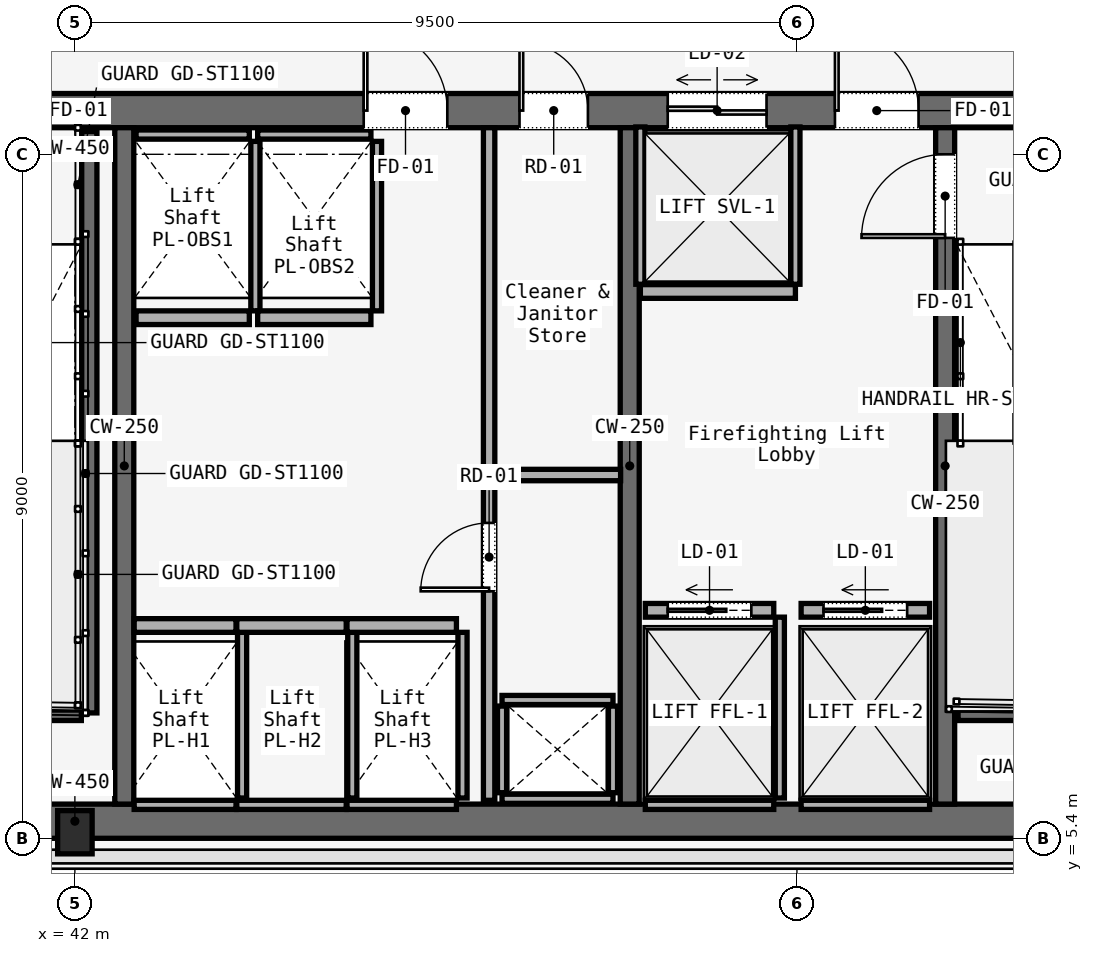
"""IFC4 building model, lengths in metres.
Left out: names, types, materials, properties, quantities, classifications, styles, units other than length and angle.
Written with IfcOpenShell. Run it as: python <this file> out.ifc"""

import sys

from ifc_helpers import new_model, si_unit, direction, frame, frame_2d, origin, origin_2d, place, context, subcontext, project, spatial, rectangle, i_section, extrude, element, fill, save


model = new_model("IFC4")
c1 = context("Model", 3, precision=1e-05, world=origin(), true_north=direction((0.0, 1.0)))
c2 = subcontext(c1, "Body", "Model", "MODEL_VIEW")
j1 = project(units=[si_unit("LENGTHUNIT", "METRE"), si_unit("PLANEANGLEUNIT", "RADIAN")], contexts=[c1])
p1 = place(None, origin())
s1 = spatial("IfcSite", under=j1, at=p1, CompositionType="ELEMENT")
p2 = place(p1, origin())
s2 = spatial("IfcBuilding", under=s1, at=p2, CompositionType="ELEMENT")
p3 = place(p2, frame((0.0, 0.0, 51.2)))
s3 = spatial("IfcBuildingStorey", under=s2, at=p3, CompositionType="ELEMENT", Elevation=51.2)
p4 = place(p3, frame((26.45, 14.975, 0.0), z_axis=(0.0, 0.0, 1.0), x_axis=(1.0, 0.0, 0.0)))
e1 = element("IfcWall", 1, at=p4, inside=s3, PredefinedType="SOLIDWALL", context=c2, shape_type="SweptSolid", body=[
    extrude(rectangle(XDim=31.1, YDim=0.45, at=frame_2d((15.55, 0.0))), origin(), (0.0, 0.0, 1.0), 3.58),
])
p5 = place(p4, frame((1.65, 0.0, 0.0)))
e2 = element("IfcOpeningElement", 2, at=p5, cuts=e1, PredefinedType="OPENING", context=c2, shape_type="SweptSolid", body=[
    extrude(rectangle(XDim=1.1, YDim=2.2, at=frame_2d((0.55, 1.1))), frame((0.0, 0.225, 0.0), z_axis=(0.0, -1.0, 0.0), x_axis=(1.0, 0.0, 0.0)), (0.0, 0.0, 1.0), 0.45),
])
p6 = place(p4, frame((13.65, 0.0, 0.0)))
e3 = element("IfcOpeningElement", 3, at=p6, cuts=e1, PredefinedType="OPENING", context=c2, shape_type="SweptSolid", body=[
    extrude(rectangle(XDim=1.1, YDim=2.2, at=frame_2d((0.55, 1.1))), frame((0.0, 0.225, 0.0), z_axis=(0.0, -1.0, 0.0), x_axis=(1.0, 0.0, 0.0)), (0.0, 0.0, 1.0), 0.45),
])
p7 = place(p4, frame((25.55, 0.0, 0.0)))
e4 = element("IfcOpeningElement", 4, at=p7, cuts=e1, PredefinedType="OPENING", context=c2, shape_type="SweptSolid", body=[
    extrude(rectangle(XDim=1.1, YDim=2.2, at=frame_2d((0.55, 1.1))), frame((0.0, 0.225, 0.0), z_axis=(0.0, -1.0, 0.0), x_axis=(1.0, 0.0, 0.0)), (0.0, 0.0, 1.0), 0.45),
])
p8 = place(p4, frame((10.7, 0.0, 0.0)))
e5 = element("IfcOpeningElement", 5, at=p8, cuts=e1, PredefinedType="OPENING", context=c2, shape_type="SweptSolid", body=[
    extrude(rectangle(XDim=1.4, YDim=2.2, at=frame_2d((0.7, 1.1))), frame((0.0, 0.225, 0.0), z_axis=(0.0, -1.0, 0.0), x_axis=(1.0, 0.0, 0.0)), (0.0, 0.0, 1.0), 0.45),
])
p9 = place(p4, frame((19.35, 0.0, 0.0)))
e6 = element("IfcOpeningElement", 6, at=p9, cuts=e1, PredefinedType="OPENING", context=c2, shape_type="SweptSolid", body=[
    extrude(rectangle(XDim=1.1, YDim=2.2, at=frame_2d((0.55, 1.1))), frame((0.0, 0.225, 0.0), z_axis=(0.0, -1.0, 0.0), x_axis=(1.0, 0.0, 0.0)), (0.0, 0.0, 1.0), 0.45),
])
p10 = place(p4, frame((21.4, 0.0, 0.0)))
e7 = element("IfcOpeningElement", 7, at=p10, cuts=e1, PredefinedType="OPENING", context=c2, shape_type="SweptSolid", body=[
    extrude(rectangle(XDim=0.9, YDim=2.1, at=frame_2d((0.45, 1.05))), frame((0.0, 0.225, 0.0), z_axis=(0.0, -1.0, 0.0), x_axis=(1.0, 0.0, 0.0)), (0.0, 0.0, 1.0), 0.45),
])
p11 = place(p4, frame((23.35, 0.0, 0.0)))
e8 = element("IfcOpeningElement", 8, at=p11, cuts=e1, PredefinedType="OPENING", context=c2, shape_type="SweptSolid", body=[
    extrude(rectangle(XDim=1.3, YDim=2.3, at=frame_2d((0.65, 1.15))), frame((0.0, 0.225, 0.0), z_axis=(0.0, -1.0, 0.0), x_axis=(1.0, 0.0, 0.0)), (0.0, 0.0, 1.0), 0.45),
])
p12 = place(p3, frame((26.45, 5.625, 0.0), z_axis=(0.0, 0.0, 1.0), x_axis=(1.0, 0.0, 0.0)))
e9 = element("IfcWall", 9, at=p12, inside=s3, PredefinedType="SOLIDWALL", context=c2, shape_type="SweptSolid", body=[
    extrude(rectangle(XDim=31.1, YDim=0.45, at=frame_2d((15.55, 0.0))), origin(), (0.0, 0.0, 1.0), 3.58),
])
for number, where, z_axis, x_axis in (
    (10, (42.65, 5.85, 0.0), (0.0, 0.0, 1.0), (0.0, 1.0, 0.0)),
    (11, (49.3, 5.85, 0.0), (0.0, 0.0, 1.0), (0.0, 1.0, 0.0)),
):
    element("IfcWall", number, at=place(p3, frame(where, z_axis=z_axis, x_axis=x_axis)), inside=s3, PredefinedType="SOLIDWALL", context=c2, shape_type="SweptSolid", body=[
        extrude(rectangle(XDim=8.9, YDim=0.25, at=frame_2d((4.45, 0.0))), origin(), (0.0, 0.0, 1.0), 3.58),
    ])
p13 = place(p3, frame((53.45, 5.85, 0.0), z_axis=(0.0, 0.0, 1.0), x_axis=(0.0, 1.0, 0.0)))
e12 = element("IfcWall", 12, at=p13, inside=s3, PredefinedType="SOLIDWALL", context=c2, shape_type="SweptSolid", body=[
    extrude(rectangle(XDim=8.9, YDim=0.25, at=frame_2d((4.45, 0.0))), origin(), (0.0, 0.0, 1.0), 3.58),
])
p14 = place(p13, frame((7.45, 0.0, 0.0)))
e13 = element("IfcOpeningElement", 13, at=p14, cuts=e12, PredefinedType="OPENING", context=c2, shape_type="SweptSolid", body=[
    extrude(rectangle(XDim=1.1, YDim=2.2, at=frame_2d((0.55, 1.1))), frame((0.0, 0.125, 0.0), z_axis=(0.0, -1.0, 0.0), x_axis=(1.0, 0.0, 0.0)), (0.0, 0.0, 1.0), 0.25),
])
p15 = place(p3, frame((42.0, 5.48, 0.0), z_axis=(0.0, 0.0, 1.0), x_axis=(1.0, 0.0, 0.0)))
e14 = element("IfcColumn", 14, at=p15, inside=s3, PredefinedType="COLUMN", context=c2, shape_type="SweptSolid", body=[
    extrude(i_section(OverallWidth=0.454, OverallDepth=0.569, WebThickness=0.078, FlangeThickness=0.08, FilletRadius=0.015, at=origin_2d()), origin(), (0.0, 0.0, 1.0), 3.58),
])
p16 = place(p3, frame((42.19, 14.7, 0.0), z_axis=(0.0, 0.0, 1.0), x_axis=(0.0, -1.0, 0.0)))
e15 = element("IfcWall", 15, at=p16, inside=s3, PredefinedType="SOLIDWALL", context=c2, shape_type="SweptSolid", body=[
    extrude(rectangle(XDim=7.65, YDim=0.2, at=frame_2d((3.825, 0.0))), origin(), (0.0, 0.0, 1.0), 3.8),
])
for number, where, z_axis, x_axis in (
    (16, (38.97, 7.05, 0.0), (0.0, 0.0, 1.0), (1.0, 0.0, 0.0)),
    (17, (53.62, 7.05, 0.0), (0.0, 0.0, 1.0), (1.0, 0.0, 0.0)),
):
    element("IfcWall", number, at=place(p3, frame(where, z_axis=z_axis, x_axis=x_axis)), inside=s3, PredefinedType="SOLIDWALL", context=c2, shape_type="SweptSolid", body=[
        extrude(rectangle(XDim=3.115, YDim=0.2, at=frame_2d((1.558, 0.0))), origin(), (0.0, 0.0, 1.0), 3.8),
    ])
for number, where, z_axis, x_axis in (
    (18, (47.62, 5.92, 0.0), (0.0, 0.0, 1.0), (1.0, 0.0, 0.0)),
    (19, (47.62, 7.22, 0.0), (0.0, 0.0, 1.0), (1.0, 0.0, 0.0)),
):
    element("IfcWall", number, at=place(p3, frame(where, z_axis=z_axis, x_axis=x_axis)), inside=s3, PredefinedType="SOLIDWALL", context=c2, shape_type="SweptSolid", body=[
        extrude(rectangle(XDim=1.46, YDim=0.12, at=frame_2d((0.73, 0.0))), origin(), (0.0, 0.0, 1.0), 2.933),
    ])
for number, where, z_axis, x_axis in (
    (20, (47.62, 6.0, 0.0), (0.0, 0.0, 1.0), (0.0, 1.0, 0.0)),
    (21, (49.08, 6.0, 0.0), (0.0, 0.0, 1.0), (0.0, 1.0, 0.0)),
):
    element("IfcWall", number, at=place(p3, frame(where, z_axis=z_axis, x_axis=x_axis)), inside=s3, PredefinedType="SOLIDWALL", context=c2, shape_type="SweptSolid", body=[
        extrude(rectangle(XDim=1.14, YDim=0.12, at=frame_2d((0.57, 0.0))), origin(), (0.0, 0.0, 1.0), 2.933),
    ])
p17 = place(p3, frame((47.45, 5.9, 0.0), z_axis=(0.0, 0.0, 1.0), x_axis=(0.0, 1.0, 0.0)))
e22 = element("IfcWall", 22, at=p17, inside=s3, PredefinedType="PARTITIONING", context=c2, shape_type="SweptSolid", body=[
    extrude(rectangle(XDim=8.85, YDim=0.15, at=frame_2d((4.425, 0.0))), origin(), (0.0, 0.0, 1.0), 2.933),
])
p18 = place(p17, frame((2.75, 0.0, 0.0)))
e23 = element("IfcOpeningElement", 23, at=p18, cuts=e22, PredefinedType="OPENING", context=c2, shape_type="SweptSolid", body=[
    extrude(rectangle(XDim=0.9, YDim=2.1, at=frame_2d((0.45, 1.05))), frame((0.0, 0.075, 0.0), z_axis=(0.0, -1.0, 0.0), x_axis=(1.0, 0.0, 0.0)), (0.0, 0.0, 1.0), 0.15),
])
p19 = place(p3, frame((47.45, 10.18, 0.0), z_axis=(0.0, 0.0, 1.0), x_axis=(1.0, 0.0, 0.0)))
e24 = element("IfcWall", 24, at=p19, inside=s3, PredefinedType="PARTITIONING", context=c2, shape_type="SweptSolid", body=[
    extrude(rectangle(XDim=1.73, YDim=0.15, at=frame_2d((0.865, 0.0))), origin(), (0.0, 0.0, 1.0), 2.933),
])
p20 = place(p3, frame((42.78, 8.2, 0.0), z_axis=(0.0, 0.0, 1.0), x_axis=(1.0, 0.0, 0.0)))
e25 = element("IfcWall", 25, at=p20, inside=s3, PredefinedType="SOLIDWALL", context=c2, shape_type="SweptSolid", body=[
    extrude(rectangle(XDim=1.34, YDim=0.18, at=frame_2d((0.67, 0.0))), origin(), (0.0, 0.0, 1.0), 2.933),
])
p21 = place(p3, frame((42.78, 5.84, 0.0), z_axis=(0.0, 0.0, 1.0), x_axis=(1.0, 0.0, 0.0)))
e26 = element("IfcWall", 26, at=p21, inside=s3, PredefinedType="SOLIDWALL", context=c2, shape_type="SweptSolid", body=[
    extrude(rectangle(XDim=1.34, YDim=0.12, at=frame_2d((0.67, 0.0))), origin(), (0.0, 0.0, 1.0), 2.933),
])
p22 = place(p3, frame((44.2, 5.93, 0.0), z_axis=(0.0, 0.0, 1.0), x_axis=(0.0, 1.0, 0.0)))
e27 = element("IfcWall", 27, at=p22, inside=s3, PredefinedType="SOLIDWALL", context=c2, shape_type="SweptSolid", body=[
    extrude(rectangle(XDim=2.18, YDim=0.12, at=frame_2d((1.09, 0.0))), origin(), (0.0, 0.0, 1.0), 2.933),
])
p23 = place(p3, frame((44.13, 8.2, 0.0), z_axis=(0.0, 0.0, 1.0), x_axis=(1.0, 0.0, 0.0)))
e28 = element("IfcWall", 28, at=p23, inside=s3, PredefinedType="SOLIDWALL", context=c2, shape_type="SweptSolid", body=[
    extrude(rectangle(XDim=1.44, YDim=0.18, at=frame_2d((0.72, 0.0))), origin(), (0.0, 0.0, 1.0), 2.933),
])
p24 = place(p3, frame((44.13, 5.84, 0.0), z_axis=(0.0, 0.0, 1.0), x_axis=(1.0, 0.0, 0.0)))
e29 = element("IfcWall", 29, at=p24, inside=s3, PredefinedType="SOLIDWALL", context=c2, shape_type="SweptSolid", body=[
    extrude(rectangle(XDim=1.44, YDim=0.12, at=frame_2d((0.72, 0.0))), origin(), (0.0, 0.0, 1.0), 2.933),
])
p25 = place(p3, frame((45.65, 5.93, 0.0), z_axis=(0.0, 0.0, 1.0), x_axis=(0.0, 1.0, 0.0)))
e30 = element("IfcWall", 30, at=p25, inside=s3, PredefinedType="SOLIDWALL", context=c2, shape_type="SweptSolid", body=[
    extrude(rectangle(XDim=2.18, YDim=0.12, at=frame_2d((1.09, 0.0))), origin(), (0.0, 0.0, 1.0), 2.933),
])
p26 = place(p3, frame((45.58, 8.2, 0.0), z_axis=(0.0, 0.0, 1.0), x_axis=(1.0, 0.0, 0.0)))
e31 = element("IfcWall", 31, at=p26, inside=s3, PredefinedType="SOLIDWALL", context=c2, shape_type="SweptSolid", body=[
    extrude(rectangle(XDim=1.44, YDim=0.18, at=frame_2d((0.72, 0.0))), origin(), (0.0, 0.0, 1.0), 2.933),
])
p27 = place(p3, frame((45.58, 5.84, 0.0), z_axis=(0.0, 0.0, 1.0), x_axis=(1.0, 0.0, 0.0)))
e32 = element("IfcWall", 32, at=p27, inside=s3, PredefinedType="SOLIDWALL", context=c2, shape_type="SweptSolid", body=[
    extrude(rectangle(XDim=1.44, YDim=0.12, at=frame_2d((0.72, 0.0))), origin(), (0.0, 0.0, 1.0), 2.933),
])
p28 = place(p3, frame((47.1, 5.93, 0.0), z_axis=(0.0, 0.0, 1.0), x_axis=(0.0, 1.0, 0.0)))
e33 = element("IfcWall", 33, at=p28, inside=s3, PredefinedType="SOLIDWALL", context=c2, shape_type="SweptSolid", body=[
    extrude(rectangle(XDim=2.18, YDim=0.12, at=frame_2d((1.09, 0.0))), origin(), (0.0, 0.0, 1.0), 2.933),
])
p29 = place(p3, frame((42.805, 12.25, 0.0), z_axis=(0.0, 0.0, 1.0), x_axis=(1.0, 0.0, 0.0)))
e34 = element("IfcWall", 34, at=p29, inside=s3, PredefinedType="SOLIDWALL", context=c2, shape_type="SweptSolid", body=[
    extrude(rectangle(XDim=1.49, YDim=0.18, at=frame_2d((0.745, 0.0))), origin(), (0.0, 0.0, 1.0), 2.933),
])
p30 = place(p3, frame((42.805, 14.66, 0.0), z_axis=(0.0, 0.0, 1.0), x_axis=(1.0, 0.0, 0.0)))
e35 = element("IfcWall", 35, at=p30, inside=s3, PredefinedType="SOLIDWALL", context=c2, shape_type="SweptSolid", body=[
    extrude(rectangle(XDim=1.49, YDim=0.12, at=frame_2d((0.745, 0.0))), origin(), (0.0, 0.0, 1.0), 2.933),
])
p31 = place(p3, frame((44.375, 12.34, 0.0), z_axis=(0.0, 0.0, 1.0), x_axis=(0.0, 1.0, 0.0)))
e36 = element("IfcWall", 36, at=p31, inside=s3, PredefinedType="SOLIDWALL", context=c2, shape_type="SweptSolid", body=[
    extrude(rectangle(XDim=2.23, YDim=0.12, at=frame_2d((1.115, 0.0))), origin(), (0.0, 0.0, 1.0), 2.933),
])
p32 = place(p3, frame((44.405, 12.25, 0.0), z_axis=(0.0, 0.0, 1.0), x_axis=(1.0, 0.0, 0.0)))
e37 = element("IfcWall", 37, at=p32, inside=s3, PredefinedType="SOLIDWALL", context=c2, shape_type="SweptSolid", body=[
    extrude(rectangle(XDim=1.49, YDim=0.18, at=frame_2d((0.745, 0.0))), origin(), (0.0, 0.0, 1.0), 2.933),
])
p33 = place(p3, frame((44.405, 14.66, 0.0), z_axis=(0.0, 0.0, 1.0), x_axis=(1.0, 0.0, 0.0)))
e38 = element("IfcWall", 38, at=p33, inside=s3, PredefinedType="SOLIDWALL", context=c2, shape_type="SweptSolid", body=[
    extrude(rectangle(XDim=1.49, YDim=0.12, at=frame_2d((0.745, 0.0))), origin(), (0.0, 0.0, 1.0), 2.933),
])
p34 = place(p3, frame((45.975, 12.34, 0.0), z_axis=(0.0, 0.0, 1.0), x_axis=(0.0, 1.0, 0.0)))
e39 = element("IfcWall", 39, at=p34, inside=s3, PredefinedType="SOLIDWALL", context=c2, shape_type="SweptSolid", body=[
    extrude(rectangle(XDim=2.23, YDim=0.12, at=frame_2d((1.115, 0.0))), origin(), (0.0, 0.0, 1.0), 2.933),
])
p35 = place(p3, frame((49.505, 8.4, 0.0), z_axis=(0.0, 0.0, 1.0), x_axis=(1.0, 0.0, 0.0)))
e40 = element("IfcWall", 40, at=p35, inside=s3, PredefinedType="SOLIDWALL", context=c2, shape_type="SweptSolid", body=[
    extrude(rectangle(XDim=1.69, YDim=0.18, at=frame_2d((0.845, 0.0))), origin(), (0.0, 0.0, 1.0), 2.933),
])
p36 = place(p35, frame((0.295, 0.0, 0.0)))
e41 = element("IfcOpeningElement", 41, at=p36, cuts=e40, PredefinedType="OPENING", context=c2, shape_type="SweptSolid", body=[
    extrude(rectangle(XDim=1.1, YDim=2.2, at=frame_2d((0.55, 1.1))), frame((0.0, 0.09, 0.0), z_axis=(0.0, -1.0, 0.0), x_axis=(1.0, 0.0, 0.0)), (0.0, 0.0, 1.0), 0.18),
])
p37 = place(p3, frame((49.505, 5.84, 0.0), z_axis=(0.0, 0.0, 1.0), x_axis=(1.0, 0.0, 0.0)))
e42 = element("IfcWall", 42, at=p37, inside=s3, PredefinedType="SOLIDWALL", context=c2, shape_type="SweptSolid", body=[
    extrude(rectangle(XDim=1.69, YDim=0.12, at=frame_2d((0.845, 0.0))), origin(), (0.0, 0.0, 1.0), 2.933),
])
p38 = place(p3, frame((51.275, 5.93, 0.0), z_axis=(0.0, 0.0, 1.0), x_axis=(0.0, 1.0, 0.0)))
e43 = element("IfcWall", 43, at=p38, inside=s3, PredefinedType="SOLIDWALL", context=c2, shape_type="SweptSolid", body=[
    extrude(rectangle(XDim=2.38, YDim=0.12, at=frame_2d((1.19, 0.0))), origin(), (0.0, 0.0, 1.0), 2.933),
])
p39 = place(p3, frame((51.555, 8.4, 0.0), z_axis=(0.0, 0.0, 1.0), x_axis=(1.0, 0.0, 0.0)))
e44 = element("IfcWall", 44, at=p39, inside=s3, PredefinedType="SOLIDWALL", context=c2, shape_type="SweptSolid", body=[
    extrude(rectangle(XDim=1.69, YDim=0.18, at=frame_2d((0.845, 0.0))), origin(), (0.0, 0.0, 1.0), 2.933),
])
p40 = place(p39, frame((0.295, 0.0, 0.0)))
e45 = element("IfcOpeningElement", 45, at=p40, cuts=e44, PredefinedType="OPENING", context=c2, shape_type="SweptSolid", body=[
    extrude(rectangle(XDim=1.1, YDim=2.2, at=frame_2d((0.55, 1.1))), frame((0.0, 0.09, 0.0), z_axis=(0.0, -1.0, 0.0), x_axis=(1.0, 0.0, 0.0)), (0.0, 0.0, 1.0), 0.18),
])
p41 = place(p3, frame((51.555, 5.84, 0.0), z_axis=(0.0, 0.0, 1.0), x_axis=(1.0, 0.0, 0.0)))
e46 = element("IfcWall", 46, at=p41, inside=s3, PredefinedType="SOLIDWALL", context=c2, shape_type="SweptSolid", body=[
    extrude(rectangle(XDim=1.69, YDim=0.12, at=frame_2d((0.845, 0.0))), origin(), (0.0, 0.0, 1.0), 2.933),
])
p42 = place(p3, frame((49.44, 12.595, 0.0), z_axis=(0.0, 0.0, 1.0), x_axis=(1.0, 0.0, 0.0)))
e47 = element("IfcWall", 47, at=p42, inside=s3, PredefinedType="SOLIDWALL", context=c2, shape_type="SweptSolid", body=[
    extrude(rectangle(XDim=2.04, YDim=0.18, at=frame_2d((1.02, 0.0))), origin(), (0.0, 0.0, 1.0), 2.933),
])
for number, where, z_axis, x_axis in (
    (48, (49.44, 12.69, 0.0), (0.0, 0.0, 1.0), (0.0, 1.0, 0.0)),
    (49, (51.48, 12.69, 0.0), (0.0, 0.0, 1.0), (0.0, 1.0, 0.0)),
):
    element("IfcWall", number, at=place(p3, frame(where, z_axis=z_axis, x_axis=x_axis)), inside=s3, PredefinedType="SOLIDWALL", context=c2, shape_type="SweptSolid", body=[
        extrude(rectangle(XDim=2.07, YDim=0.12, at=frame_2d((1.035, 0.0))), origin(), (0.0, 0.0, 1.0), 2.933),
    ])
p43 = place(p7, origin())
e50 = element("IfcDoor", 50, at=p43, inside=s3, OperationType="SINGLE_SWING_RIGHT", PredefinedType="DOOR", context=c2, shape_type="SweptSolid", body=[
    extrude(rectangle(XDim=1.1, YDim=2.2, at=frame_2d((0.55, 1.1))), frame((0.0, 0.025, 0.0), z_axis=(0.0, -1.0, 0.0), x_axis=(1.0, 0.0, 0.0)), (0.0, 0.0, 1.0), 0.05),
])
fill(e4, e50)
p44 = place(p9, origin())
e51 = element("IfcDoor", 51, at=p44, inside=s3, OperationType="SINGLE_SWING_LEFT", PredefinedType="DOOR", context=c2, shape_type="SweptSolid", body=[
    extrude(rectangle(XDim=1.1, YDim=2.2, at=frame_2d((0.55, 1.1))), frame((0.0, 0.025, 0.0), z_axis=(0.0, -1.0, 0.0), x_axis=(1.0, 0.0, 0.0)), (0.0, 0.0, 1.0), 0.05),
])
fill(e6, e51)
p45 = place(p10, origin())
e52 = element("IfcDoor", 52, at=p45, inside=s3, OperationType="SINGLE_SWING_LEFT", PredefinedType="DOOR", context=c2, shape_type="SweptSolid", body=[
    extrude(rectangle(XDim=0.9, YDim=2.1, at=frame_2d((0.45, 1.05))), frame((0.0, 0.025, 0.0), z_axis=(0.0, -1.0, 0.0), x_axis=(1.0, 0.0, 0.0)), (0.0, 0.0, 1.0), 0.05),
])
fill(e7, e52)
p46 = place(p14, origin())
e53 = element("IfcDoor", 53, at=p46, inside=s3, OperationType="SINGLE_SWING_LEFT", PredefinedType="DOOR", context=c2, shape_type="SweptSolid", body=[
    extrude(rectangle(XDim=1.1, YDim=2.2, at=frame_2d((0.55, 1.1))), frame((0.0, 0.025, 0.0), z_axis=(0.0, -1.0, 0.0), x_axis=(1.0, 0.0, 0.0)), (0.0, 0.0, 1.0), 0.05),
])
fill(e13, e53)
p47 = place(p18, origin())
e54 = element("IfcDoor", 54, at=p47, inside=s3, OperationType="SINGLE_SWING_RIGHT", PredefinedType="DOOR", context=c2, shape_type="SweptSolid", body=[
    extrude(rectangle(XDim=0.9, YDim=2.1, at=frame_2d((0.45, 1.05))), frame((0.0, 0.025, 0.0), z_axis=(0.0, -1.0, 0.0), x_axis=(1.0, 0.0, 0.0)), (0.0, 0.0, 1.0), 0.05),
])
fill(e23, e54)
p48 = place(p36, origin())
e55 = element("IfcDoor", 55, at=p48, inside=s3, OperationType="SLIDING_TO_LEFT", PredefinedType="DOOR", context=c2, shape_type="SweptSolid", body=[
    extrude(rectangle(XDim=1.1, YDim=2.2, at=frame_2d((0.55, 1.1))), frame((0.0, 0.025, 0.0), z_axis=(0.0, -1.0, 0.0), x_axis=(1.0, 0.0, 0.0)), (0.0, 0.0, 1.0), 0.05),
])
fill(e41, e55)
p49 = place(p40, origin())
e56 = element("IfcDoor", 56, at=p49, inside=s3, OperationType="SLIDING_TO_LEFT", PredefinedType="DOOR", context=c2, shape_type="SweptSolid", body=[
    extrude(rectangle(XDim=1.1, YDim=2.2, at=frame_2d((0.55, 1.1))), frame((0.0, 0.025, 0.0), z_axis=(0.0, -1.0, 0.0), x_axis=(1.0, 0.0, 0.0)), (0.0, 0.0, 1.0), 0.05),
])
fill(e45, e56)
p50 = place(p11, origin())
e57 = element("IfcDoor", 57, at=p50, inside=s3, OperationType="DOUBLE_DOOR_SLIDING", PredefinedType="DOOR", context=c2, shape_type="SweptSolid", body=[
    extrude(rectangle(XDim=1.3, YDim=2.3, at=frame_2d((0.65, 1.15))), frame((0.0, 0.025, 0.0), z_axis=(0.0, -1.0, 0.0), x_axis=(1.0, 0.0, 0.0)), (0.0, 0.0, 1.0), 0.05),
])
fill(e8, e57)
save(model, sys.argv[1])
